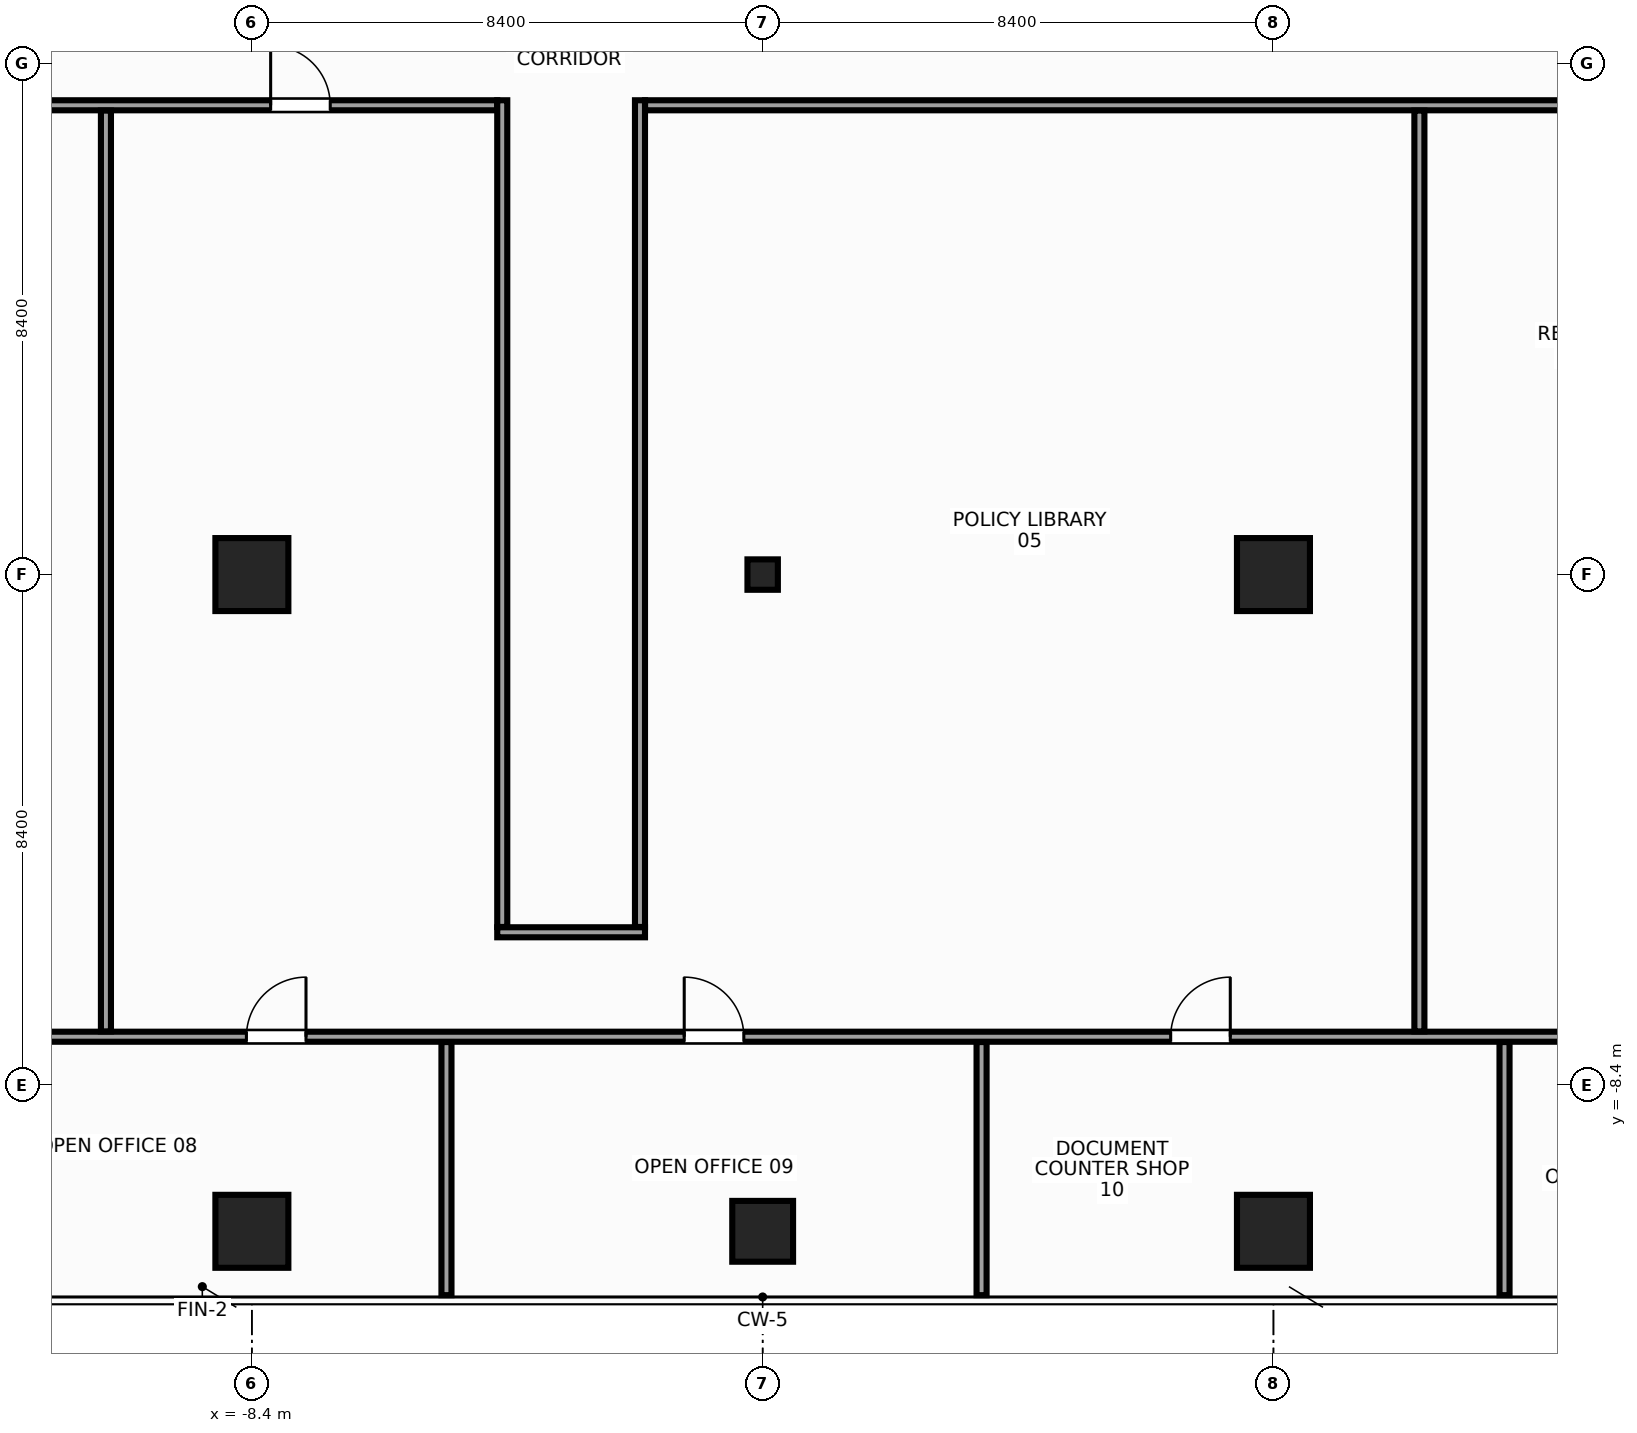
"""IFC4 building model, lengths in metres.
Left out: names, types, materials, properties, quantities, classifications, styles, units other than length and angle.
Written with IfcOpenShell. Run it as: python <this file> out.ifc"""

import sys

from ifc_helpers import new_model, si_unit, direction, frame, frame_2d, origin, origin_with_axes, origin_2d, place, context, subcontext, project, spatial, rectangle, hollow_rectangle, extrude, source, transform, mapped, element, fill, save


model = new_model("IFC4")
c1 = context("Model", 3, precision=1e-05, world=origin(), true_north=direction((0.0, 1.0)))
c2 = subcontext(c1, "Body", "Model", "MODEL_VIEW")
j1 = project(units=[si_unit("LENGTHUNIT", "METRE"), si_unit("PLANEANGLEUNIT", "RADIAN")], contexts=[c1])
p1 = place(None, origin())
s1 = spatial("IfcSite", under=j1, at=p1, CompositionType="ELEMENT")
p2 = place(p1, origin())
s2 = spatial("IfcBuilding", under=s1, at=p2, CompositionType="ELEMENT")
p3 = place(p2, frame((0.0, 0.0, 257.6)))
s3 = spatial("IfcBuildingStorey", under=s2, at=p3, CompositionType="ELEMENT", Elevation=257.6)
m1 = source(origin(), c2, "Body", "SweptSolid", [
    extrude(rectangle(XDim=1.2, YDim=1.2, at=origin_2d()), origin(), (0.0, 0.0, 1.0), 3.6),
])
for number, where, z_axis, x_axis in (
    (1, (-8.4, 0.0, 0.0), (0.0, 0.0, 1.0), (1.0, 0.0, 0.0)),
    (2, (-8.4, -10.8, 0.0), (0.0, 0.0, 1.0), (1.0, 0.0, 0.0)),
    (3, (8.4, 0.0, 0.0), (0.0, 0.0, 1.0), (1.0, 0.0, 0.0)),
    (4, (8.4, -10.8, 0.0), (0.0, 0.0, 1.0), (1.0, 0.0, 0.0)),
):
    element("IfcColumn", number, at=place(p3, frame(where, z_axis=z_axis, x_axis=x_axis)), inside=s3, PredefinedType="COLUMN", context=c2, shape_type="MappedRepresentation", body=[
        mapped(m1, transform((0.0, 0.0, 0.0), x_axis=(1.0, 0.0, 0.0), y_axis=(0.0, 1.0, 0.0), z_axis=(0.0, 0.0, 1.0), scale=1.0)),
    ])
m2 = source(origin(), c2, "Body", "SweptSolid", [
    extrude(rectangle(XDim=1.0, YDim=1.0, at=origin_2d()), origin(), (0.0, 0.0, 1.0), 3.6),
])
p4 = place(p3, frame((0.0, -10.8, 0.0), z_axis=(0.0, 0.0, 1.0), x_axis=(1.0, 0.0, 0.0)))
e5 = element("IfcColumn", 5, at=p4, inside=s3, PredefinedType="COLUMN", context=c2, shape_type="MappedRepresentation", body=[
    mapped(m2, transform((0.0, 0.0, 0.0), x_axis=(1.0, 0.0, 0.0), y_axis=(0.0, 1.0, 0.0), z_axis=(0.0, 0.0, 1.0), scale=1.0)),
])
m3 = source(origin(), c2, "Body", "SweptSolid", [
    extrude(hollow_rectangle(XDim=0.5, YDim=0.5, WallThickness=0.025, at=origin_2d()), origin(), (0.0, 0.0, 1.0), 3.6),
])
p5 = place(p3, origin_with_axes())
e6 = element("IfcColumn", 6, at=p5, inside=s3, PredefinedType="COLUMN", context=c2, shape_type="MappedRepresentation", body=[
    mapped(m3, transform((0.0, 0.0, 0.0), x_axis=(1.0, 0.0, 0.0), y_axis=(0.0, 1.0, 0.0), z_axis=(0.0, 0.0, 1.0), scale=1.0)),
])
m4 = source(origin(), c2, "Body", "SweptSolid", [
    extrude(rectangle(XDim=15.6, YDim=0.165, at=frame_2d((7.8, 0.0))), origin(), (0.0, 0.0, 1.0), 2.755),
])
p6 = place(p3, frame((-19.965, 7.718, 0.0), z_axis=(0.0, 0.0, 1.0), x_axis=(1.0, 0.0, 0.0)))
e7 = element("IfcWall", 7, at=p6, inside=s3, PredefinedType="PARTITIONING", context=c2, shape_type="MappedRepresentation", body=[
    mapped(m4, transform((0.0, 0.0, 0.0), x_axis=(1.0, 0.0, 0.0), y_axis=(0.0, 1.0, 0.0), z_axis=(0.0, 0.0, 1.0), scale=1.0)),
])
p7 = place(p6, frame((1.014, 0.0, 0.0)))
e8 = element("IfcOpeningElement", 8, at=p7, cuts=e7, PredefinedType="OPENING", context=c2, shape_type="SweptSolid", body=[
    extrude(rectangle(XDim=0.98, YDim=2.15, at=frame_2d((0.49, 1.075))), frame((0.0, 0.094, 0.0), z_axis=(0.0, -1.0, 0.0), x_axis=(1.0, 0.0, 0.0)), (0.0, 0.0, 1.0), 0.189),
])
p8 = place(p6, frame((5.575, 0.0, 0.0)))
e9 = element("IfcOpeningElement", 9, at=p8, cuts=e7, PredefinedType="OPENING", context=c2, shape_type="SweptSolid", body=[
    extrude(rectangle(XDim=0.98, YDim=2.15, at=frame_2d((0.49, 1.075))), frame((0.0, 0.094, 0.0), z_axis=(0.0, -1.0, 0.0), x_axis=(1.0, 0.0, 0.0)), (0.0, 0.0, 1.0), 0.189),
])
p9 = place(p6, frame((11.874, 0.0, 0.0)))
e10 = element("IfcOpeningElement", 10, at=p9, cuts=e7, PredefinedType="OPENING", context=c2, shape_type="SweptSolid", body=[
    extrude(rectangle(XDim=0.98, YDim=2.15, at=frame_2d((0.49, 1.075))), frame((0.0, 0.094, 0.0), z_axis=(0.0, -1.0, 0.0), x_axis=(1.0, 0.0, 0.0)), (0.0, 0.0, 1.0), 0.189),
])
m5 = source(origin(), c2, "Body", "SweptSolid", [
    extrude(rectangle(XDim=21.9, YDim=0.165, at=frame_2d((10.95, 0.0))), origin(), (0.0, 0.0, 1.0), 2.755),
])
p10 = place(p3, frame((-1.935, 7.718, 0.0), z_axis=(0.0, 0.0, 1.0), x_axis=(1.0, 0.0, 0.0)))
e11 = element("IfcWall", 11, at=p10, inside=s3, PredefinedType="PARTITIONING", context=c2, shape_type="MappedRepresentation", body=[
    mapped(m5, transform((0.0, 0.0, 0.0), x_axis=(1.0, 0.0, 0.0), y_axis=(0.0, 1.0, 0.0), z_axis=(0.0, 0.0, 1.0), scale=1.0)),
])
p11 = place(p10, frame((19.906, 0.0, 0.0)))
e12 = element("IfcOpeningElement", 12, at=p11, cuts=e11, PredefinedType="OPENING", context=c2, shape_type="SweptSolid", body=[
    extrude(rectangle(XDim=0.98, YDim=2.15, at=frame_2d((0.49, 1.075))), frame((0.0, 0.094, 0.0), z_axis=(0.0, -1.0, 0.0), x_axis=(1.0, 0.0, 0.0)), (0.0, 0.0, 1.0), 0.189),
])
p12 = place(p10, frame((15.345, 0.0, 0.0)))
e13 = element("IfcOpeningElement", 13, at=p12, cuts=e11, PredefinedType="OPENING", context=c2, shape_type="SweptSolid", body=[
    extrude(rectangle(XDim=0.98, YDim=2.15, at=frame_2d((0.49, 1.075))), frame((0.0, 0.094, 0.0), z_axis=(0.0, -1.0, 0.0), x_axis=(1.0, 0.0, 0.0)), (0.0, 0.0, 1.0), 0.189),
])
m6 = source(origin(), c2, "Body", "SweptSolid", [
    extrude(rectangle(XDim=2.43, YDim=0.165, at=frame_2d((1.215, 0.0))), origin(), (0.0, 0.0, 1.0), 3.37),
])
p13 = place(p3, frame((-4.365, -5.883, 0.0), z_axis=(0.0, 0.0, 1.0), x_axis=(1.0, 0.0, 0.0)))
e14 = element("IfcWall", 14, at=p13, inside=s3, PredefinedType="PARTITIONING", context=c2, shape_type="MappedRepresentation", body=[
    mapped(m6, transform((0.0, 0.0, 0.0), x_axis=(1.0, 0.0, 0.0), y_axis=(0.0, 1.0, 0.0), z_axis=(0.0, 0.0, 1.0), scale=1.0)),
])
m7 = source(origin(), c2, "Body", "SweptSolid", [
    extrude(rectangle(XDim=13.595, YDim=0.165, at=frame_2d((6.797, 0.0))), origin(), (0.0, 0.0, 1.0), 2.655),
])
for number, where, z_axis, x_axis in (
    (15, (-4.282, -5.795, 0.0), (0.0, 0.0, 1.0), (0.0, 1.0, 0.0)),
    (16, (-2.018, -5.795, 0.0), (0.0, 0.0, 1.0), (0.0, 1.0, 0.0)),
):
    element("IfcWall", number, at=place(p3, frame(where, z_axis=z_axis, x_axis=x_axis)), inside=s3, PredefinedType="PARTITIONING", context=c2, shape_type="MappedRepresentation", body=[
        mapped(m7, transform((0.0, 0.0, 0.0), x_axis=(1.0, 0.0, 0.0), y_axis=(0.0, 1.0, 0.0), z_axis=(0.0, 0.0, 1.0), scale=1.0)),
    ])
m8 = source(origin(), c2, "Body", "SweptSolid", [
    extrude(rectangle(XDim=35.184, YDim=0.165, at=frame_2d((17.592, 0.0))), origin(), (0.0, 0.0, 1.0), 2.755),
])
p14 = place(p3, frame((-17.592, -7.6, 0.0), z_axis=(0.0, 0.0, 1.0), x_axis=(1.0, 0.0, 0.0)))
e17 = element("IfcWall", 17, at=p14, inside=s3, PredefinedType="PARTITIONING", context=c2, shape_type="MappedRepresentation", body=[
    mapped(m8, transform((0.0, 0.0, 0.0), x_axis=(1.0, 0.0, 0.0), y_axis=(0.0, 1.0, 0.0), z_axis=(0.0, 0.0, 1.0), scale=1.0)),
])
p15 = place(p14, frame((2.402, 0.0, 0.0)))
e18 = element("IfcOpeningElement", 18, at=p15, cuts=e17, PredefinedType="OPENING", context=c2, shape_type="SweptSolid", body=[
    extrude(rectangle(XDim=0.98, YDim=2.15, at=frame_2d((0.49, 1.075))), frame((0.0, 0.094, 0.0), z_axis=(0.0, -1.0, 0.0), x_axis=(1.0, 0.0, 0.0)), (0.0, 0.0, 1.0), 0.189),
])
p16 = place(p14, frame((31.702, 0.0, 0.0)))
e19 = element("IfcOpeningElement", 19, at=p16, cuts=e17, PredefinedType="OPENING", context=c2, shape_type="SweptSolid", body=[
    extrude(rectangle(XDim=0.98, YDim=2.15, at=frame_2d((0.49, 1.075))), frame((0.0, 0.094, 0.0), z_axis=(0.0, -1.0, 0.0), x_axis=(1.0, 0.0, 0.0)), (0.0, 0.0, 1.0), 0.189),
])
p17 = place(p14, frame((9.102, 0.0, 0.0)))
e20 = element("IfcOpeningElement", 20, at=p17, cuts=e17, PredefinedType="OPENING", context=c2, shape_type="SweptSolid", body=[
    extrude(rectangle(XDim=0.98, YDim=2.15, at=frame_2d((0.49, 1.075))), frame((0.0, 0.094, 0.0), z_axis=(0.0, -1.0, 0.0), x_axis=(1.0, 0.0, 0.0)), (0.0, 0.0, 1.0), 0.189),
])
p18 = place(p14, frame((16.302, 0.0, 0.0)))
e21 = element("IfcOpeningElement", 21, at=p18, cuts=e17, PredefinedType="OPENING", context=c2, shape_type="SweptSolid", body=[
    extrude(rectangle(XDim=0.98, YDim=2.15, at=frame_2d((0.49, 1.075))), frame((0.0, 0.094, 0.0), z_axis=(0.0, -1.0, 0.0), x_axis=(1.0, 0.0, 0.0)), (0.0, 0.0, 1.0), 0.189),
])
p19 = place(p14, frame((24.302, 0.0, 0.0)))
e22 = element("IfcOpeningElement", 22, at=p19, cuts=e17, PredefinedType="OPENING", context=c2, shape_type="SweptSolid", body=[
    extrude(rectangle(XDim=0.98, YDim=2.15, at=frame_2d((0.49, 1.075))), frame((0.0, 0.094, 0.0), z_axis=(0.0, -1.0, 0.0), x_axis=(1.0, 0.0, 0.0)), (0.0, 0.0, 1.0), 0.189),
])
m9 = source(origin(), c2, "Body", "SweptSolid", [
    extrude(rectangle(XDim=15.142, YDim=0.165, at=frame_2d((7.571, 0.0))), origin(), (0.0, 0.0, 1.0), 2.655),
])
for number, where, z_axis, x_axis in (
    (23, (-10.8, -7.512, 0.0), (0.0, 0.0, 1.0), (0.0, 1.0, 0.0)),
    (24, (10.8, -7.512, 0.0), (0.0, 0.0, 1.0), (0.0, 1.0, 0.0)),
):
    element("IfcWall", number, at=place(p3, frame(where, z_axis=z_axis, x_axis=x_axis)), inside=s3, PredefinedType="PARTITIONING", context=c2, shape_type="MappedRepresentation", body=[
        mapped(m9, transform((0.0, 0.0, 0.0), x_axis=(1.0, 0.0, 0.0), y_axis=(0.0, 1.0, 0.0), z_axis=(0.0, 0.0, 1.0), scale=1.0)),
    ])
m10 = source(origin(), c2, "Body", "SweptSolid", [
    extrude(rectangle(XDim=4.163, YDim=0.165, at=frame_2d((2.081, 0.0))), origin(), (0.0, 0.0, 1.0), 2.905),
])
for number, where, z_axis, x_axis in (
    (25, (-5.2, -11.85, 0.0), (0.0, 0.0, 1.0), (0.0, 1.0, 0.0)),
    (26, (3.6, -11.85, 0.0), (0.0, 0.0, 1.0), (0.0, 1.0, 0.0)),
    (27, (12.2, -11.85, 0.0), (0.0, 0.0, 1.0), (0.0, 1.0, 0.0)),
):
    element("IfcWall", number, at=place(p3, frame(where, z_axis=z_axis, x_axis=x_axis)), inside=s3, PredefinedType="PARTITIONING", context=c2, shape_type="MappedRepresentation", body=[
        mapped(m10, transform((0.0, 0.0, 0.0), x_axis=(1.0, 0.0, 0.0), y_axis=(0.0, 1.0, 0.0), z_axis=(0.0, 0.0, 1.0), scale=1.0)),
    ])
m11 = source(origin(), c2, "Body", "SweptSolid", [
    extrude(rectangle(XDim=0.98, YDim=2.15, at=frame_2d((0.49, 1.075))), frame((0.0, 0.025, 0.0), z_axis=(0.0, -1.0, 0.0), x_axis=(1.0, 0.0, 0.0)), (0.0, 0.0, 1.0), 0.05),
])
p20 = place(p9, origin())
e28 = element("IfcDoor", 28, at=p20, inside=s3, OperationType="SINGLE_SWING_LEFT", PredefinedType="DOOR", context=c2, shape_type="MappedRepresentation", body=[
    mapped(m11, transform((0.0, 0.0, 0.0), x_axis=(1.0, 0.0, 0.0), y_axis=(0.0, 1.0, 0.0), z_axis=(0.0, 0.0, 1.0), scale=1.0)),
])
fill(e10, e28)
p21 = place(p17, origin())
e29 = element("IfcDoor", 29, at=p21, inside=s3, OperationType="SINGLE_SWING_RIGHT", PredefinedType="DOOR", context=c2, shape_type="MappedRepresentation", body=[
    mapped(m11, transform((0.0, 0.0, 0.0), x_axis=(1.0, 0.0, 0.0), y_axis=(0.0, 1.0, 0.0), z_axis=(0.0, 0.0, 1.0), scale=1.0)),
])
fill(e20, e29)
p22 = place(p18, origin())
e30 = element("IfcDoor", 30, at=p22, inside=s3, OperationType="SINGLE_SWING_LEFT", PredefinedType="DOOR", context=c2, shape_type="MappedRepresentation", body=[
    mapped(m11, transform((0.0, 0.0, 0.0), x_axis=(1.0, 0.0, 0.0), y_axis=(0.0, 1.0, 0.0), z_axis=(0.0, 0.0, 1.0), scale=1.0)),
])
fill(e21, e30)
p23 = place(p19, origin())
e31 = element("IfcDoor", 31, at=p23, inside=s3, OperationType="SINGLE_SWING_RIGHT", PredefinedType="DOOR", context=c2, shape_type="MappedRepresentation", body=[
    mapped(m11, transform((0.0, 0.0, 0.0), x_axis=(1.0, 0.0, 0.0), y_axis=(0.0, 1.0, 0.0), z_axis=(0.0, 0.0, 1.0), scale=1.0)),
])
fill(e22, e31)
save(model, sys.argv[1])
